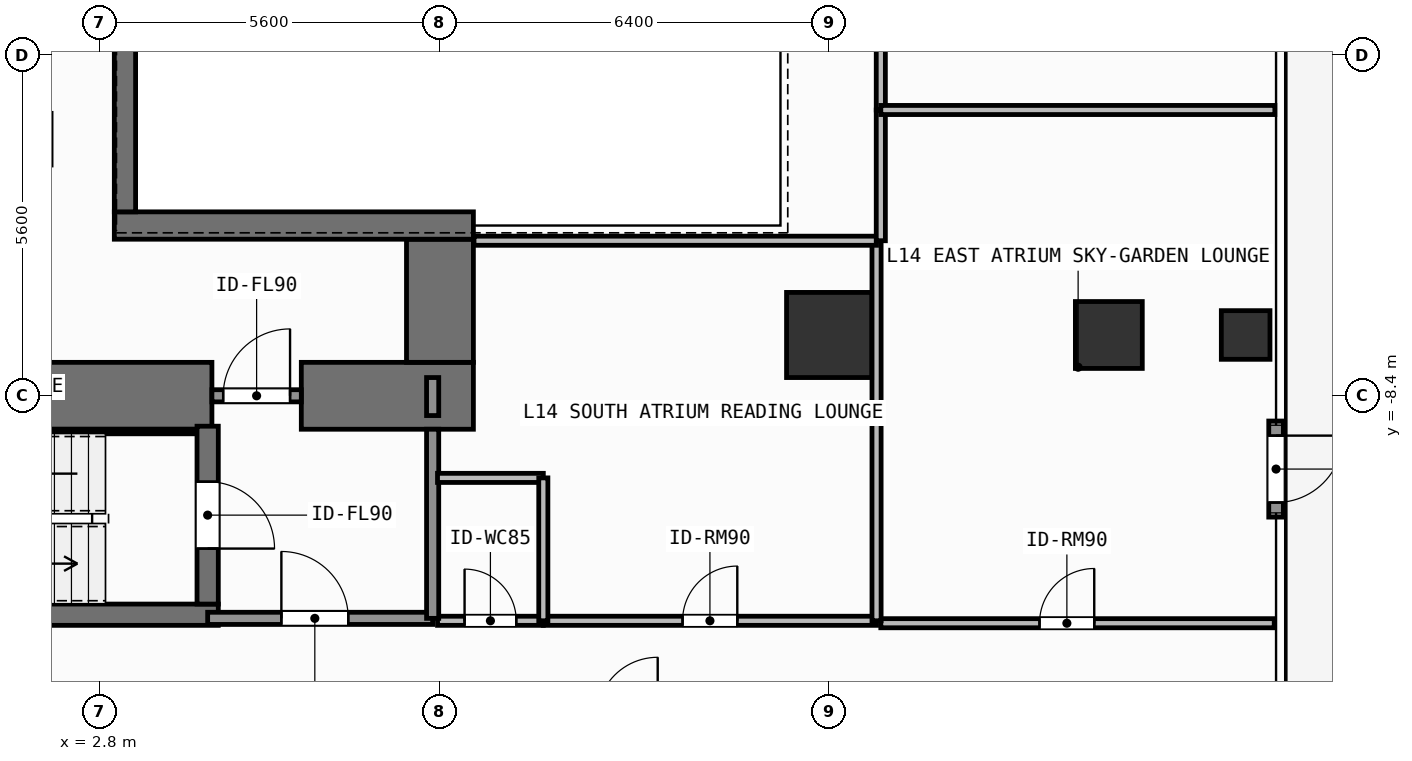
"""IFC4 building model, lengths in metres.
Left out: names, types, materials, properties, quantities, classifications, styles, units other than length and angle.
Written with IfcOpenShell. Run it as: python <this file> out.ifc"""

import sys

from ifc_helpers import new_model, si_unit, direction, frame, frame_2d, origin, origin_2d, place, context, subcontext, project, spatial, rectangle, hollow_rectangle, extrude, element, fill, save


model = new_model("IFC4")
c1 = context("Model", 3, precision=1e-05, world=origin(), true_north=direction((0.0, 1.0)))
c2 = subcontext(c1, "Body", "Model", "MODEL_VIEW")
j1 = project(units=[si_unit("LENGTHUNIT", "METRE"), si_unit("PLANEANGLEUNIT", "RADIAN")], contexts=[c1])
p1 = place(None, origin())
s1 = spatial("IfcSite", under=j1, at=p1, CompositionType="ELEMENT")
p2 = place(p1, origin())
s2 = spatial("IfcBuilding", under=s1, at=p2, CompositionType="ELEMENT")
p3 = place(p2, frame((0.0, 0.0, 54.0)))
s3 = spatial("IfcBuildingStorey", under=s2, at=p3, CompositionType="ELEMENT", Elevation=54.0)
p4 = place(p3, frame((-2.62, -8.4, 0.0), z_axis=(0.0, 0.0, 1.0), x_axis=(1.0, 0.0, 0.0)))
e1 = element("IfcWall", 1, at=p4, inside=s3, PredefinedType="SHEAR", context=c2, shape_type="SweptSolid", body=[
    extrude(rectangle(XDim=7.27, YDim=1.1, at=frame_2d((3.635, 0.0))), origin(), (0.0, 0.0, 1.0), 3.9),
])
p5 = place(p3, frame((6.12, -8.4, 0.0), z_axis=(0.0, 0.0, 1.0), x_axis=(1.0, 0.0, 0.0)))
e2 = element("IfcWall", 2, at=p5, inside=s3, PredefinedType="SHEAR", context=c2, shape_type="SweptSolid", body=[
    extrude(rectangle(XDim=2.83, YDim=1.1, at=frame_2d((1.415, 0.0))), origin(), (0.0, 0.0, 1.0), 3.9),
])
p6 = place(p3, frame((8.4, -7.85, 0.0), z_axis=(0.0, 0.0, 1.0), x_axis=(0.0, 1.0, 0.0)))
e3 = element("IfcWall", 3, at=p6, inside=s3, PredefinedType="SHEAR", context=c2, shape_type="SweptSolid", body=[
    extrude(rectangle(XDim=2.025, YDim=1.1, at=frame_2d((1.013, 0.0))), origin(), (0.0, 0.0, 1.0), 3.9),
])
p7 = place(p3, frame((3.045, -5.6, 0.0), z_axis=(0.0, 0.0, 1.0), x_axis=(1.0, 0.0, 0.0)))
e4 = element("IfcWall", 4, at=p7, inside=s3, PredefinedType="SHEAR", context=c2, shape_type="SweptSolid", body=[
    extrude(rectangle(XDim=5.905, YDim=0.45, at=frame_2d((2.953, 0.0))), origin(), (0.0, 0.0, 1.0), 3.9),
])
p8 = place(p3, frame((3.22, -5.375, 0.0), z_axis=(0.0, 0.0, 1.0), x_axis=(0.0, 1.0, 0.0)))
e5 = element("IfcWall", 5, at=p8, inside=s3, PredefinedType="SHEAR", context=c2, shape_type="SweptSolid", body=[
    extrude(rectangle(XDim=10.75, YDim=0.35, at=frame_2d((5.375, 0.0))), origin(), (0.0, 0.0, 1.0), 3.9),
])
p9 = place(p3, frame((-2.555, -12.0, 0.0), z_axis=(0.0, 0.0, 1.0), x_axis=(1.0, 0.0, 0.0)))
e6 = element("IfcWall", 6, at=p9, inside=s3, PredefinedType="SHEAR", context=c2, shape_type="SweptSolid", body=[
    extrude(rectangle(XDim=7.31, YDim=0.35, at=frame_2d((3.655, 0.0))), origin(), (0.0, 0.0, 1.0), 3.9),
])
p10 = place(p3, frame((-2.2, -8.988, 0.0), z_axis=(0.0, 0.0, 1.0), x_axis=(1.0, 0.0, 0.0)))
e7 = element("IfcWall", 7, at=p10, inside=s3, PredefinedType="SHEAR", context=c2, shape_type="SweptSolid", body=[
    extrude(rectangle(XDim=6.6, YDim=0.075, at=frame_2d((3.3, 0.0))), origin(), (0.0, 0.0, 1.0), 3.9),
])
p11 = place(p3, frame((4.58, -8.9, 0.0), z_axis=(0.0, 0.0, 1.0), x_axis=(0.0, -1.0, 0.0)))
e8 = element("IfcWall", 8, at=p11, inside=s3, PredefinedType="SHEAR", context=c2, shape_type="SweptSolid", body=[
    extrude(rectangle(XDim=2.925, YDim=0.35, at=frame_2d((1.462, 0.0))), origin(), (0.0, 0.0, 1.0), 3.9),
])
p12 = place(p11, frame((0.913, 0.0, 0.0)))
e9 = element("IfcOpeningElement", 9, at=p12, cuts=e8, PredefinedType="OPENING", context=c2, shape_type="SweptSolid", body=[
    extrude(rectangle(XDim=1.1, YDim=2.15, at=frame_2d((0.55, 1.075))), frame((0.0, 0.185, 0.0), z_axis=(0.0, -1.0, 0.0), x_axis=(1.0, 0.0, 0.0)), (0.0, 0.0, 1.0), 0.37),
])
p13 = place(p3, frame((14.8, -7.4, 0.0), z_axis=(0.0, 0.0, 1.0), x_axis=(1.0, 0.0, 0.0)))
e10 = element("IfcColumn", 10, at=p13, inside=s3, PredefinedType="COLUMN", context=c2, shape_type="SweptSolid", body=[
    extrude(rectangle(XDim=1.4, YDim=1.4, at=origin_2d()), origin(), (0.0, 0.0, 1.0), 3.9),
])
p14 = place(p3, frame((19.4, -7.4, 0.0), z_axis=(0.0, 0.0, 1.0), x_axis=(1.0, 0.0, 0.0)))
e11 = element("IfcColumn", 11, at=p14, inside=s3, PredefinedType="COLUMN", context=c2, shape_type="SweptSolid", body=[
    extrude(rectangle(XDim=1.1, YDim=1.1, at=origin_2d()), origin(), (0.0, 0.0, 1.0), 3.9),
])
p15 = place(p3, frame((21.65, -7.4, 0.0), z_axis=(0.0, 0.0, 1.0), x_axis=(1.0, 0.0, 0.0)))
e12 = element("IfcColumn", 12, at=p15, inside=s3, PredefinedType="COLUMN", context=c2, shape_type="SweptSolid", body=[
    extrude(hollow_rectangle(XDim=0.8, YDim=0.8, WallThickness=0.036, at=origin_2d()), origin(), (0.0, 0.0, 1.0), 3.9),
])
p16 = place(p3, frame((22.15, -8.815, 0.0), z_axis=(0.0, 0.0, 1.0), x_axis=(0.0, -1.0, 0.0)))
e13 = element("IfcWall", 13, at=p16, inside=s3, PredefinedType="SOLIDWALL", context=c2, shape_type="SweptSolid", body=[
    extrude(rectangle(XDim=1.58, YDim=0.24, at=frame_2d((0.79, 0.0))), origin(), (0.0, 0.0, 1.0), 3.68),
])
p17 = place(p16, frame((0.24, 0.0, 0.0)))
e14 = element("IfcOpeningElement", 14, at=p17, cuts=e13, PredefinedType="OPENING", context=c2, shape_type="SweptSolid", body=[
    extrude(rectangle(XDim=1.1, YDim=2.2, at=frame_2d((0.55, 1.1))), frame((0.0, 0.13, 0.0), z_axis=(0.0, -1.0, 0.0), x_axis=(1.0, 0.0, 0.0)), (0.0, 0.0, 1.0), 0.26),
])
p18 = place(p3, frame((4.58, -12.06, 0.0), z_axis=(0.0, 0.0, 1.0), x_axis=(1.0, 0.0, 0.0)))
e15 = element("IfcWall", 15, at=p18, inside=s3, PredefinedType="SOLIDWALL", context=c2, shape_type="SweptSolid", body=[
    extrude(rectangle(XDim=3.7, YDim=0.2, at=frame_2d((1.85, 0.0))), origin(), (0.0, 0.0, 1.0), 3.68),
])
p19 = place(p18, frame((1.212, 0.0, 0.0)))
e16 = element("IfcOpeningElement", 16, at=p19, cuts=e15, PredefinedType="OPENING", context=c2, shape_type="SweptSolid", body=[
    extrude(rectangle(XDim=1.1, YDim=2.15, at=frame_2d((0.55, 1.075))), frame((0.0, 0.11, 0.0), z_axis=(0.0, -1.0, 0.0), x_axis=(1.0, 0.0, 0.0)), (0.0, 0.0, 1.0), 0.22),
])
p20 = place(p3, frame((4.65, -8.4, 0.0), z_axis=(0.0, 0.0, 1.0), x_axis=(1.0, 0.0, 0.0)))
e17 = element("IfcWall", 17, at=p20, inside=s3, PredefinedType="SOLIDWALL", context=c2, shape_type="SweptSolid", body=[
    extrude(rectangle(XDim=1.47, YDim=0.2, at=frame_2d((0.735, 0.0))), origin(), (0.0, 0.0, 1.0), 2.72),
])
p21 = place(p20, frame((0.185, 0.0, 0.0)))
e18 = element("IfcOpeningElement", 18, at=p21, cuts=e17, PredefinedType="OPENING", context=c2, shape_type="SweptSolid", body=[
    extrude(rectangle(XDim=1.1, YDim=2.15, at=frame_2d((0.55, 1.075))), frame((0.0, 0.11, 0.0), z_axis=(0.0, -1.0, 0.0), x_axis=(1.0, 0.0, 0.0)), (0.0, 0.0, 1.0), 0.22),
])
p22 = place(p3, frame((8.36, -12.1, 0.0), z_axis=(0.0, 0.0, 1.0), x_axis=(1.0, 0.0, 0.0)))
e19 = element("IfcWall", 19, at=p22, inside=s3, PredefinedType="PARTITIONING", context=c2, shape_type="SweptSolid", body=[
    extrude(rectangle(XDim=1.74, YDim=0.15, at=frame_2d((0.87, 0.0))), origin(), (0.0, 0.0, 1.0), 3.68),
])
p23 = place(p22, frame((0.445, 0.0, 0.0)))
e20 = element("IfcOpeningElement", 20, at=p23, cuts=e19, PredefinedType="OPENING", context=c2, shape_type="SweptSolid", body=[
    extrude(rectangle(XDim=0.85, YDim=2.1, at=frame_2d((0.425, 1.05))), frame((0.0, 0.085, 0.0), z_axis=(0.0, -1.0, 0.0), x_axis=(1.0, 0.0, 0.0)), (0.0, 0.0, 1.0), 0.17),
])
p24 = place(p3, frame((10.1, -12.1, 0.0), z_axis=(0.0, 0.0, 1.0), x_axis=(1.0, 0.0, 0.0)))
e21 = element("IfcWall", 21, at=p24, inside=s3, PredefinedType="PARTITIONING", context=c2, shape_type="SweptSolid", body=[
    extrude(rectangle(XDim=5.48, YDim=0.15, at=frame_2d((2.74, 0.0))), origin(), (0.0, 0.0, 1.0), 3.68),
])
p25 = place(p24, frame((2.29, 0.0, 0.0)))
e22 = element("IfcOpeningElement", 22, at=p25, cuts=e21, PredefinedType="OPENING", context=c2, shape_type="SweptSolid", body=[
    extrude(rectangle(XDim=0.9, YDim=2.1, at=frame_2d((0.45, 1.05))), frame((0.0, 0.085, 0.0), z_axis=(0.0, -1.0, 0.0), x_axis=(1.0, 0.0, 0.0)), (0.0, 0.0, 1.0), 0.17),
])
p26 = place(p3, frame((15.65, -12.14, 0.0), z_axis=(0.0, 0.0, 1.0), x_axis=(1.0, 0.0, 0.0)))
e23 = element("IfcWall", 23, at=p26, inside=s3, PredefinedType="PARTITIONING", context=c2, shape_type="SweptSolid", body=[
    extrude(rectangle(XDim=6.47, YDim=0.15, at=frame_2d((3.235, 0.0))), origin(), (0.0, 0.0, 1.0), 3.68),
])
p27 = place(p26, frame((2.61, 0.0, 0.0)))
e24 = element("IfcOpeningElement", 24, at=p27, cuts=e23, PredefinedType="OPENING", context=c2, shape_type="SweptSolid", body=[
    extrude(rectangle(XDim=0.9, YDim=2.1, at=frame_2d((0.45, 1.05))), frame((0.0, 0.085, 0.0), z_axis=(0.0, -1.0, 0.0), x_axis=(1.0, 0.0, 0.0)), (0.0, 0.0, 1.0), 0.17),
])
p28 = place(p3, frame((8.28, -12.06, 0.0), z_axis=(0.0, 0.0, 1.0), x_axis=(0.0, 1.0, 0.0)))
e25 = element("IfcWall", 25, at=p28, inside=s3, PredefinedType="SOLIDWALL", context=c2, shape_type="SweptSolid", body=[
    extrude(rectangle(XDim=3.11, YDim=0.2, at=frame_2d((1.555, 0.0))), origin(), (0.0, 0.0, 1.0), 3.68),
])
p29 = place(p3, frame((8.28, -8.725, 0.0), z_axis=(0.0, 0.0, 1.0), x_axis=(0.0, 1.0, 0.0)))
e26 = element("IfcWall", 26, at=p29, inside=s3, PredefinedType="SOLIDWALL", context=c2, shape_type="SweptSolid", body=[
    extrude(rectangle(XDim=0.625, YDim=0.2, at=frame_2d((0.312, 0.0))), origin(), (0.0, 0.0, 1.0), 3.68),
])
p30 = place(p3, frame((8.36, -9.75, 0.0), z_axis=(0.0, 0.0, 1.0), x_axis=(1.0, 0.0, 0.0)))
e27 = element("IfcWall", 27, at=p30, inside=s3, PredefinedType="PARTITIONING", context=c2, shape_type="SweptSolid", body=[
    extrude(rectangle(XDim=1.74, YDim=0.15, at=frame_2d((0.87, 0.0))), origin(), (0.0, 0.0, 1.0), 3.68),
])
p31 = place(p3, frame((10.1, -12.1, 0.0), z_axis=(0.0, 0.0, 1.0), x_axis=(0.0, 1.0, 0.0)))
e28 = element("IfcWall", 28, at=p31, inside=s3, PredefinedType="PARTITIONING", context=c2, shape_type="SweptSolid", body=[
    extrude(rectangle(XDim=2.35, YDim=0.15, at=frame_2d((1.175, 0.0))), origin(), (0.0, 0.0, 1.0), 3.68),
])
p32 = place(p3, frame((15.58, -12.1, 0.0), z_axis=(0.0, 0.0, 1.0), x_axis=(0.0, 1.0, 0.0)))
e29 = element("IfcWall", 29, at=p32, inside=s3, PredefinedType="PARTITIONING", context=c2, shape_type="SweptSolid", body=[
    extrude(rectangle(XDim=6.25, YDim=0.15, at=frame_2d((3.125, 0.0))), origin(), (0.0, 0.0, 1.0), 3.68),
])
p33 = place(p3, frame((8.96, -5.85, 0.0), z_axis=(0.0, 0.0, 1.0), x_axis=(1.0, 0.0, 0.0)))
e30 = element("IfcWall", 30, at=p33, inside=s3, PredefinedType="PARTITIONING", context=c2, shape_type="SweptSolid", body=[
    extrude(rectangle(XDim=6.62, YDim=0.15, at=frame_2d((3.31, 0.0))), origin(), (0.0, 0.0, 1.0), 3.68),
])
p34 = place(p3, frame((15.65, -5.85, 0.0), z_axis=(0.0, 0.0, 1.0), x_axis=(0.0, 1.0, 0.0)))
e31 = element("IfcWall", 31, at=p34, inside=s3, PredefinedType="PARTITIONING", context=c2, shape_type="SweptSolid", body=[
    extrude(rectangle(XDim=2.15, YDim=0.15, at=frame_2d((1.075, 0.0))), origin(), (0.0, 0.0, 1.0), 3.68),
])
p35 = place(p3, frame((15.65, -3.7, 0.0), z_axis=(0.0, 0.0, 1.0), x_axis=(0.0, 1.0, 0.0)))
e32 = element("IfcWall", 32, at=p35, inside=s3, PredefinedType="PARTITIONING", context=c2, shape_type="SweptSolid", body=[
    extrude(rectangle(XDim=9.55, YDim=0.15, at=frame_2d((4.775, 0.0))), origin(), (0.0, 0.0, 1.0), 3.68),
])
p36 = place(p3, frame((15.65, -3.7, 0.0), z_axis=(0.0, 0.0, 1.0), x_axis=(1.0, 0.0, 0.0)))
e33 = element("IfcWall", 33, at=p36, inside=s3, PredefinedType="PARTITIONING", context=c2, shape_type="SweptSolid", body=[
    extrude(rectangle(XDim=6.48, YDim=0.15, at=frame_2d((3.24, 0.0))), origin(), (0.0, 0.0, 1.0), 3.68),
])
p37 = place(p17, origin())
e34 = element("IfcDoor", 34, at=p37, inside=s3, OperationType="SINGLE_SWING_LEFT", PredefinedType="DOOR", context=c2, shape_type="SweptSolid", body=[
    extrude(rectangle(XDim=1.1, YDim=2.2, at=frame_2d((0.55, 1.1))), frame((0.0, 0.025, 0.0), z_axis=(0.0, -1.0, 0.0), x_axis=(1.0, 0.0, 0.0)), (0.0, 0.0, 1.0), 0.05),
])
fill(e14, e34)
p38 = place(p12, origin())
e35 = element("IfcDoor", 35, at=p38, inside=s3, OperationType="SINGLE_SWING_RIGHT", PredefinedType="DOOR", context=c2, shape_type="SweptSolid", body=[
    extrude(rectangle(XDim=1.1, YDim=2.15, at=frame_2d((0.55, 1.075))), frame((0.0, 0.025, 0.0), z_axis=(0.0, -1.0, 0.0), x_axis=(1.0, 0.0, 0.0)), (0.0, 0.0, 1.0), 0.05),
])
fill(e9, e35)
p39 = place(p19, origin())
e36 = element("IfcDoor", 36, at=p39, inside=s3, OperationType="SINGLE_SWING_LEFT", PredefinedType="DOOR", context=c2, shape_type="SweptSolid", body=[
    extrude(rectangle(XDim=1.1, YDim=2.15, at=frame_2d((0.55, 1.075))), frame((0.0, 0.025, 0.0), z_axis=(0.0, -1.0, 0.0), x_axis=(1.0, 0.0, 0.0)), (0.0, 0.0, 1.0), 0.05),
])
fill(e16, e36)
p40 = place(p21, origin())
e37 = element("IfcDoor", 37, at=p40, inside=s3, OperationType="SINGLE_SWING_RIGHT", PredefinedType="DOOR", context=c2, shape_type="SweptSolid", body=[
    extrude(rectangle(XDim=1.1, YDim=2.15, at=frame_2d((0.55, 1.075))), frame((0.0, 0.025, 0.0), z_axis=(0.0, -1.0, 0.0), x_axis=(1.0, 0.0, 0.0)), (0.0, 0.0, 1.0), 0.05),
])
fill(e18, e37)
p41 = place(p23, origin())
e38 = element("IfcDoor", 38, at=p41, inside=s3, OperationType="SINGLE_SWING_LEFT", PredefinedType="DOOR", context=c2, shape_type="SweptSolid", body=[
    extrude(rectangle(XDim=0.85, YDim=2.1, at=frame_2d((0.425, 1.05))), frame((0.0, 0.025, 0.0), z_axis=(0.0, -1.0, 0.0), x_axis=(1.0, 0.0, 0.0)), (0.0, 0.0, 1.0), 0.05),
])
fill(e20, e38)
p42 = place(p25, origin())
e39 = element("IfcDoor", 39, at=p42, inside=s3, OperationType="SINGLE_SWING_RIGHT", PredefinedType="DOOR", context=c2, shape_type="SweptSolid", body=[
    extrude(rectangle(XDim=0.9, YDim=2.1, at=frame_2d((0.45, 1.05))), frame((0.0, 0.025, 0.0), z_axis=(0.0, -1.0, 0.0), x_axis=(1.0, 0.0, 0.0)), (0.0, 0.0, 1.0), 0.05),
])
fill(e22, e39)
p43 = place(p27, origin())
e40 = element("IfcDoor", 40, at=p43, inside=s3, OperationType="SINGLE_SWING_RIGHT", PredefinedType="DOOR", context=c2, shape_type="SweptSolid", body=[
    extrude(rectangle(XDim=0.9, YDim=2.1, at=frame_2d((0.45, 1.05))), frame((0.0, 0.025, 0.0), z_axis=(0.0, -1.0, 0.0), x_axis=(1.0, 0.0, 0.0)), (0.0, 0.0, 1.0), 0.05),
])
fill(e24, e40)
save(model, sys.argv[1])
